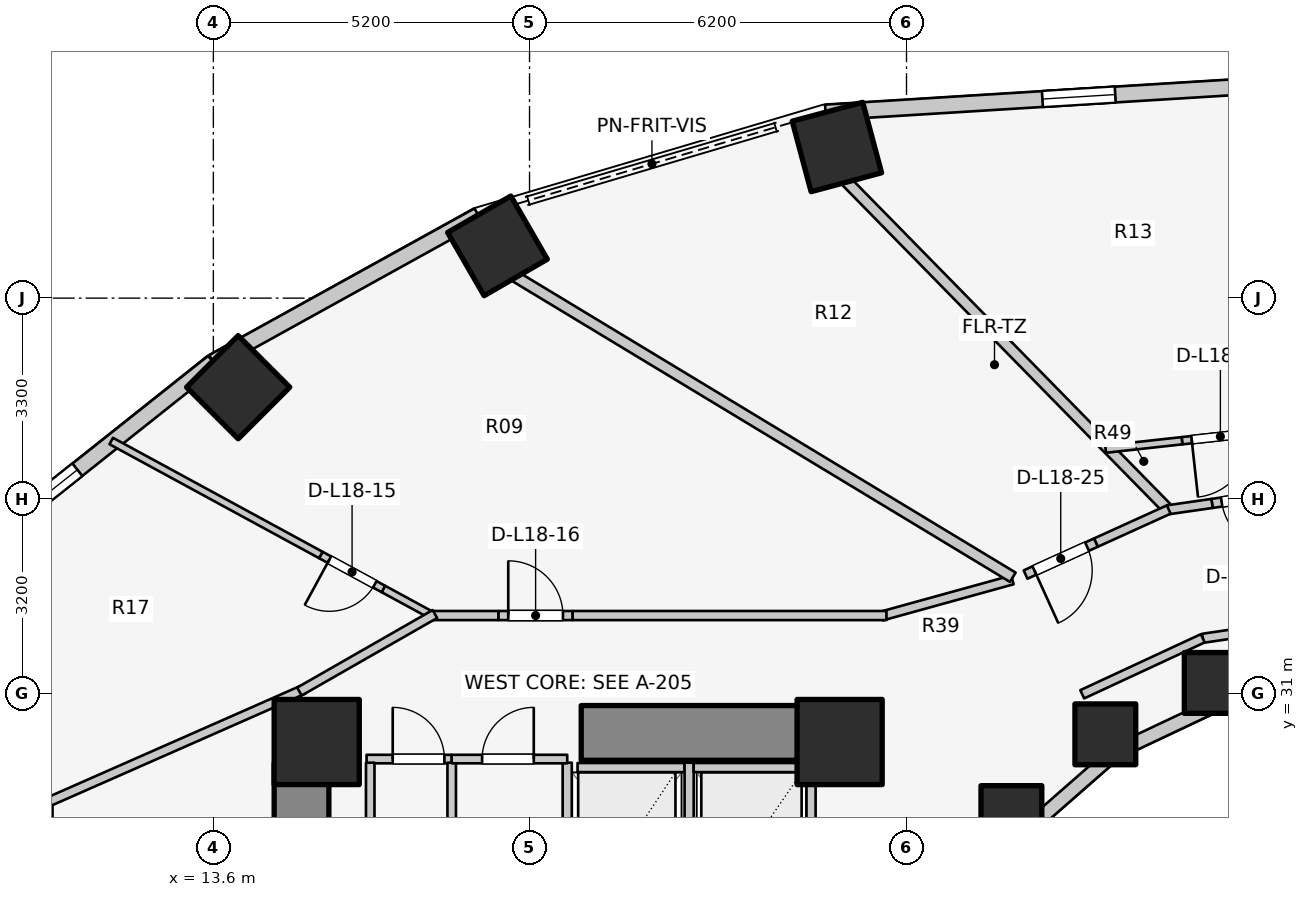
"""IFC4 building model, lengths in metres.
Left out: names, types, materials, properties, quantities, classifications, styles, units other than length and angle.
Written with IfcOpenShell. Run it as: python <this file> out.ifc"""

import sys

from ifc_helpers import new_model, si_unit, direction, frame, frame_2d, origin, origin_2d, place, context, subcontext, project, spatial, rectangle, extrude, element, fill, save


model = new_model("IFC4")
c1 = context("Model", 3, precision=1e-05, world=origin(), true_north=direction((0.0, 1.0)))
c2 = subcontext(c1, "Body", "Model", "MODEL_VIEW")
j1 = project(units=[si_unit("LENGTHUNIT", "METRE"), si_unit("PLANEANGLEUNIT", "RADIAN")], contexts=[c1])
p1 = place(None, origin())
s1 = spatial("IfcSite", under=j1, at=p1, CompositionType="ELEMENT")
p2 = place(p1, origin())
s2 = spatial("IfcBuilding", under=s1, at=p2, CompositionType="ELEMENT")
p3 = place(p2, frame((0.0, 0.0, 61.7)))
s3 = spatial("IfcBuildingStorey", under=s2, at=p3, CompositionType="ELEMENT", Elevation=61.7)
p4 = place(p3, frame((15.05, 17.05, 0.0), z_axis=(0.0, 0.0, 1.0), x_axis=(0.0, 1.0, 0.0)))
e1 = element("IfcWall", 1, at=p4, inside=s3, PredefinedType="SHEAR", context=c2, shape_type="SweptSolid", body=[
    extrude(rectangle(XDim=12.8, YDim=0.9, at=frame_2d((6.4, 0.0))), origin(), (0.0, 0.0, 1.0), 3.1),
])
p5 = place(p3, frame((19.65, 30.35, 0.0), z_axis=(0.0, 0.0, 1.0), x_axis=(1.0, 0.0, 0.0)))
e2 = element("IfcWall", 2, at=p5, inside=s3, PredefinedType="SHEAR", context=c2, shape_type="SweptSolid", body=[
    extrude(rectangle(XDim=4.5, YDim=0.9, at=frame_2d((2.25, 0.0))), origin(), (0.0, 0.0, 1.0), 3.1),
])
for number, where, z_axis, x_axis in (
    (3, (23.9, 30.2, 0.0), (0.0, 0.0, 1.0), (1.0, 0.0, 0.0)),
    (4, (15.3, 30.2, 0.0), (0.0, 0.0, 1.0), (1.0, 0.0, 0.0)),
):
    element("IfcColumn", number, at=place(p3, frame(where, z_axis=z_axis, x_axis=x_axis)), inside=s3, PredefinedType="COLUMN", context=c2, shape_type="SweptSolid", body=[
        extrude(rectangle(XDim=1.4, YDim=1.4, at=origin_2d()), origin(), (0.0, 0.0, 1.0), 3.1),
    ])
p6 = place(p3, frame((30.069, 31.172, 0.0), z_axis=(0.0, 0.0, 1.0), x_axis=(1.0, 0.0, 0.0)))
e5 = element("IfcColumn", 5, at=p6, inside=s3, PredefinedType="COLUMN", context=c2, shape_type="SweptSolid", body=[
    extrude(rectangle(XDim=1.0, YDim=1.0, at=origin_2d()), origin(), (0.0, 0.0, 1.0), 3.1),
])
p7 = place(p3, frame((23.855, 39.986, 0.0), z_axis=(0.0, 0.0, 1.0), x_axis=(-0.258819045103, 0.965925826289, 0.0)))
e6 = element("IfcColumn", 6, at=p7, inside=s3, PredefinedType="COLUMN", context=c2, shape_type="SweptSolid", body=[
    extrude(rectangle(XDim=1.2, YDim=1.2, at=origin_2d()), origin(), (0.0, 0.0, 1.0), 3.1),
])
p8 = place(p3, frame((28.27, 30.327, 0.0), z_axis=(0.0, 0.0, 1.0), x_axis=(1.0, 0.0, 0.0)))
e7 = element("IfcColumn", 7, at=p8, inside=s3, PredefinedType="COLUMN", context=c2, shape_type="SweptSolid", body=[
    extrude(rectangle(XDim=1.0, YDim=1.0, at=origin_2d()), origin(), (0.0, 0.0, 1.0), 3.1),
])
p9 = place(p3, frame((18.273, 38.359, 0.0), z_axis=(0.0, 0.0, 1.0), x_axis=(-0.5, 0.866025403784, 0.0)))
e8 = element("IfcColumn", 8, at=p9, inside=s3, PredefinedType="COLUMN", context=c2, shape_type="SweptSolid", body=[
    extrude(rectangle(XDim=1.2, YDim=1.2, at=origin_2d()), origin(), (0.0, 0.0, 1.0), 3.1),
])
p10 = place(p3, frame((26.725, 28.982, 0.0), z_axis=(0.0, 0.0, 1.0), x_axis=(1.0, 0.0, 0.0)))
e9 = element("IfcColumn", 9, at=p10, inside=s3, PredefinedType="COLUMN", context=c2, shape_type="SweptSolid", body=[
    extrude(rectangle(XDim=1.0, YDim=1.0, at=origin_2d()), origin(), (0.0, 0.0, 1.0), 3.1),
])
p11 = place(p3, frame((14.008, 36.035, 0.0), z_axis=(0.0, 0.0, 1.0), x_axis=(-0.707106781187, 0.707106781187, 0.0)))
e10 = element("IfcColumn", 10, at=p11, inside=s3, PredefinedType="COLUMN", context=c2, shape_type="SweptSolid", body=[
    extrude(rectangle(XDim=1.2, YDim=1.2, at=origin_2d()), origin(), (0.0, 0.0, 1.0), 3.1),
])
p12 = place(p3, frame((32.0, 31.12, 0.0), z_axis=(0.0, 0.0, 1.0), x_axis=(-0.988901730308, -0.148571086668, 0.0)))
e11 = element("IfcWall", 11, at=p12, inside=s3, PredefinedType="STANDARD", context=c2, shape_type="SweptSolid", body=[
    extrude(rectangle(XDim=1.864, YDim=0.23, at=frame_2d((0.932, 0.0))), origin(), (0.0, 0.0, 1.0), 1.22),
])
p13 = place(p3, frame((30.157, 30.843, 0.0), z_axis=(0.0, 0.0, 1.0), x_axis=(-0.904179699603, -0.427152280606, 0.0)))
e12 = element("IfcWall", 12, at=p13, inside=s3, PredefinedType="STANDARD", context=c2, shape_type="SweptSolid", body=[
    extrude(rectangle(XDim=1.899, YDim=0.23, at=frame_2d((0.95, 0.0))), origin(), (0.0, 0.0, 1.0), 1.22),
])
p14 = place(p3, frame((28.44, 30.032, 0.0), z_axis=(0.0, 0.0, 1.0), x_axis=(-0.752576694707, -0.658504607869, 0.0)))
e13 = element("IfcWall", 13, at=p14, inside=s3, PredefinedType="STANDARD", context=c2, shape_type="SweptSolid", body=[
    extrude(rectangle(XDim=1.959, YDim=0.23, at=frame_2d((0.98, 0.0))), origin(), (0.0, 0.0, 1.0), 1.22),
])
p15 = place(p3, frame((32.0, 41.069, 0.0), z_axis=(0.0, 0.0, 1.0), x_axis=(-0.998090514779, -0.061768311519, 0.0)))
e14 = element("IfcWall", 14, at=p15, inside=s3, PredefinedType="STANDARD", context=c2, shape_type="SweptSolid", body=[
    extrude(rectangle(XDim=8.348, YDim=0.26, at=frame_2d((4.174, 0.0))), origin(), (0.0, 0.0, 1.0), 1.22),
])
p16 = place(p15, frame((3.574, 0.0, 0.15)))
e15 = element("IfcOpeningElement", 15, at=p16, cuts=e14, PredefinedType="OPENING", context=c2, shape_type="SweptSolid", body=[
    extrude(rectangle(XDim=1.2, YDim=0.9, at=frame_2d((0.6, 0.45))), frame((0.0, 0.14, 0.0), z_axis=(0.0, -1.0, 0.0), x_axis=(1.0, 0.0, 0.0)), (0.0, 0.0, 1.0), 0.28),
])
p17 = place(p3, frame((17.958, 38.862, 0.0), z_axis=(0.0, 0.0, 1.0), x_axis=(-0.875137303239, -0.483874674352, 0.0)))
e16 = element("IfcWall", 16, at=p17, inside=s3, PredefinedType="STANDARD", context=c2, shape_type="SweptSolid", body=[
    extrude(rectangle(XDim=4.985, YDim=0.26, at=frame_2d((2.493, 0.0))), origin(), (0.0, 0.0, 1.0), 1.22),
])
p18 = place(p3, frame((13.595, 36.45, 0.0), z_axis=(0.0, 0.0, 1.0), x_axis=(-0.783123133379, -0.621866672179, 0.0)))
e17 = element("IfcWall", 17, at=p18, inside=s3, PredefinedType="STANDARD", context=c2, shape_type="SweptSolid", body=[
    extrude(rectangle(XDim=4.839, YDim=0.26, at=frame_2d((2.419, 0.0))), origin(), (0.0, 0.0, 1.0), 1.22),
])
p19 = place(p18, frame((2.849, 0.0, 0.15)))
e18 = element("IfcOpeningElement", 18, at=p19, cuts=e17, PredefinedType="OPENING", context=c2, shape_type="SweptSolid", body=[
    extrude(rectangle(XDim=1.2, YDim=0.9, at=frame_2d((0.6, 0.45))), frame((0.0, 0.14, 0.0), z_axis=(0.0, -1.0, 0.0), x_axis=(1.0, 0.0, 0.0)), (0.0, 0.0, 1.0), 0.28),
])
p20 = place(p3, frame((19.59, 29.78, 0.0), z_axis=(0.0, 0.0, 1.0), x_axis=(1.0, 0.0, 0.0)))
e19 = element("IfcWall", 19, at=p20, inside=s3, PredefinedType="SOLIDWALL", context=c2, shape_type="SweptSolid", body=[
    extrude(rectangle(XDim=1.76, YDim=0.15, at=frame_2d((0.88, 0.0))), origin(), (0.0, 0.0, 1.0), 2.575),
])
for number, where, z_axis, x_axis in (
    (20, (19.42, 27.14, 0.0), (0.0, 0.0, 1.0), (0.0, 1.0, 0.0)),
    (21, (21.425, 27.14, 0.0), (0.0, 0.0, 1.0), (0.0, 1.0, 0.0)),
):
    element("IfcWall", number, at=place(p3, frame(where, z_axis=z_axis, x_axis=x_axis)), inside=s3, PredefinedType="SOLIDWALL", context=c2, shape_type="SweptSolid", body=[
        extrude(rectangle(XDim=2.72, YDim=0.15, at=frame_2d((1.36, 0.0))), origin(), (0.0, 0.0, 1.0), 2.575),
    ])
p21 = place(p3, frame((21.5, 29.78, 0.0), z_axis=(0.0, 0.0, 1.0), x_axis=(1.0, 0.0, 0.0)))
e22 = element("IfcWall", 22, at=p21, inside=s3, PredefinedType="SOLIDWALL", context=c2, shape_type="SweptSolid", body=[
    extrude(rectangle(XDim=1.76, YDim=0.15, at=frame_2d((0.88, 0.0))), origin(), (0.0, 0.0, 1.0), 2.575),
])
p22 = place(p3, frame((23.43, 27.14, 0.0), z_axis=(0.0, 0.0, 1.0), x_axis=(0.0, 1.0, 0.0)))
e23 = element("IfcWall", 23, at=p22, inside=s3, PredefinedType="SOLIDWALL", context=c2, shape_type="SweptSolid", body=[
    extrude(rectangle(XDim=2.72, YDim=0.15, at=frame_2d((1.36, 0.0))), origin(), (0.0, 0.0, 1.0), 2.575),
])
p23 = place(p3, frame((16.12, 29.92, 0.0), z_axis=(0.0, 0.0, 1.0), x_axis=(1.0, 0.0, 0.0)))
e24 = element("IfcWall", 24, at=p23, inside=s3, PredefinedType="PLUMBINGWALL", context=c2, shape_type="SweptSolid", body=[
    extrude(rectangle(XDim=1.4, YDim=0.14, at=frame_2d((0.7, 0.0))), origin(), (0.0, 0.0, 1.0), 2.575),
])
p24 = place(p23, frame((0.43, 0.0, 0.0)))
e25 = element("IfcOpeningElement", 25, at=p24, cuts=e24, PredefinedType="OPENING", context=c2, shape_type="SweptSolid", body=[
    extrude(rectangle(XDim=0.85, YDim=2.05, at=frame_2d((0.425, 1.025))), frame((0.0, 0.08, 0.0), z_axis=(0.0, -1.0, 0.0), x_axis=(1.0, 0.0, 0.0)), (0.0, 0.0, 1.0), 0.16),
])
for number, where, z_axis, x_axis in (
    (26, (16.18, 25.98, 0.0), (0.0, 0.0, 1.0), (0.0, 1.0, 0.0)),
    (27, (17.52, 25.98, 0.0), (0.0, 0.0, 1.0), (0.0, 1.0, 0.0)),
):
    element("IfcWall", number, at=place(p3, frame(where, z_axis=z_axis, x_axis=x_axis)), inside=s3, PredefinedType="PLUMBINGWALL", context=c2, shape_type="SweptSolid", body=[
        extrude(rectangle(XDim=3.88, YDim=0.14, at=frame_2d((1.94, 0.0))), origin(), (0.0, 0.0, 1.0), 2.575),
    ])
p25 = place(p3, frame((17.52, 29.92, 0.0), z_axis=(0.0, 0.0, 1.0), x_axis=(1.0, 0.0, 0.0)))
e28 = element("IfcWall", 28, at=p25, inside=s3, PredefinedType="PLUMBINGWALL", context=c2, shape_type="SweptSolid", body=[
    extrude(rectangle(XDim=1.9, YDim=0.14, at=frame_2d((0.95, 0.0))), origin(), (0.0, 0.0, 1.0), 2.575),
])
p26 = place(p25, frame((0.5, 0.0, 0.0)))
e29 = element("IfcOpeningElement", 29, at=p26, cuts=e28, PredefinedType="OPENING", context=c2, shape_type="SweptSolid", body=[
    extrude(rectangle(XDim=0.85, YDim=2.05, at=frame_2d((0.425, 1.025))), frame((0.0, 0.08, 0.0), z_axis=(0.0, -1.0, 0.0), x_axis=(1.0, 0.0, 0.0)), (0.0, 0.0, 1.0), 0.16),
])
p27 = place(p3, frame((32.0, 32.22, 0.0), z_axis=(0.0, 0.0, 1.0), x_axis=(-0.989268584896, -0.146108408166, 0.0)))
e30 = element("IfcWall", 30, at=p27, inside=s3, PredefinedType="PARTITIONING", context=c2, shape_type="SweptSolid", body=[
    extrude(rectangle(XDim=2.151, YDim=0.15, at=frame_2d((1.075, 0.0))), origin(), (0.0, 0.0, 1.0), 1.22),
])
p28 = place(p3, frame((29.873, 31.906, 0.0), z_axis=(0.0, 0.0, 1.0), x_axis=(-0.906943449489, -0.421252393975, 0.0)))
e31 = element("IfcWall", 31, at=p28, inside=s3, PredefinedType="PARTITIONING", context=c2, shape_type="SweptSolid", body=[
    extrude(rectangle(XDim=2.186, YDim=0.15, at=frame_2d((1.093, 0.0))), origin(), (0.0, 0.0, 1.0), 1.22),
])
p29 = place(p3, frame((10.844, 29.196, 0.0), z_axis=(0.0, 0.0, 1.0), x_axis=(0.91502756289, 0.403391322604, 0.0)))
e32 = element("IfcWall", 32, at=p29, inside=s3, PredefinedType="PARTITIONING", context=c2, shape_type="SweptSolid", body=[
    extrude(rectangle(XDim=4.637, YDim=0.15, at=frame_2d((2.319, 0.0))), origin(), (0.0, 0.0, 1.0), 1.22),
])
p30 = place(p3, frame((17.244, 32.256, 0.0), z_axis=(0.0, 0.0, 1.0), x_axis=(-0.878580692024, 0.477593935894, 0.0)))
e33 = element("IfcWall", 33, at=p30, inside=s3, PredefinedType="MOVABLE", context=c2, shape_type="SweptSolid", body=[
    extrude(rectangle(XDim=0.966, YDim=0.12, at=frame_2d((0.483, 0.0))), origin(), (0.0, 0.0, 1.0), 2.575),
])
p31 = place(p3, frame((16.396, 32.717, 0.0), z_axis=(0.0, 0.0, 1.0), x_axis=(-0.878540750178, 0.4776674055, 0.0)))
e34 = element("IfcWall", 34, at=p31, inside=s3, PredefinedType="MOVABLE", context=c2, shape_type="SweptSolid", body=[
    extrude(rectangle(XDim=1.17, YDim=0.12, at=frame_2d((0.585, 0.0))), origin(), (0.0, 0.0, 1.0), 2.11),
])
p32 = place(p31, frame((0.16, 0.0, 0.0)))
e35 = element("IfcOpeningElement", 35, at=p32, cuts=e34, PredefinedType="OPENING", context=c2, shape_type="SweptSolid", body=[
    extrude(rectangle(XDim=0.85, YDim=2.05, at=frame_2d((0.425, 1.025))), frame((0.0, 0.07, 0.0), z_axis=(0.0, -1.0, 0.0), x_axis=(1.0, 0.0, 0.0)), (0.0, 0.0, 1.0), 0.14),
])
p33 = place(p3, frame((15.368, 33.276, 0.0), z_axis=(0.0, 0.0, 1.0), x_axis=(-0.878543913196, 0.477661587932, 0.0)))
e36 = element("IfcWall", 36, at=p33, inside=s3, PredefinedType="MOVABLE", context=c2, shape_type="SweptSolid", body=[
    extrude(rectangle(XDim=3.924, YDim=0.12, at=frame_2d((1.962, 0.0))), origin(), (0.0, 0.0, 1.0), 1.22),
])
p34 = place(p3, frame((26.742, 32.867, 0.0), z_axis=(0.0, 0.0, 1.0), x_axis=(-0.963833843713, -0.266503886865, 0.0)))
e37 = element("IfcWall", 37, at=p34, inside=s3, PredefinedType="PARTITIONING", context=c2, shape_type="SweptSolid", body=[
    extrude(rectangle(XDim=2.232, YDim=0.15, at=frame_2d((1.116, 0.0))), origin(), (0.0, 0.0, 1.0), 1.22),
])
p35 = place(p3, frame((17.15, 32.28, 0.0), z_axis=(0.0, 0.0, 1.0), x_axis=(1.0, 0.0, 0.0)))
e38 = element("IfcWall", 38, at=p35, inside=s3, PredefinedType="PARTITIONING", context=c2, shape_type="SweptSolid", body=[
    extrude(rectangle(XDim=1.14, YDim=0.15, at=frame_2d((0.57, 0.0))), origin(), (0.0, 0.0, 1.0), 2.575),
])
p36 = place(p3, frame((18.29, 32.28, 0.0), z_axis=(0.0, 0.0, 1.0), x_axis=(1.0, 0.0, 0.0)))
e39 = element("IfcWall", 39, at=p36, inside=s3, PredefinedType="PARTITIONING", context=c2, shape_type="SweptSolid", body=[
    extrude(rectangle(XDim=1.22, YDim=0.15, at=frame_2d((0.61, 0.0))), origin(), (0.0, 0.0, 1.0), 2.16),
])
p37 = place(p36, frame((0.16, 0.0, 0.0)))
e40 = element("IfcOpeningElement", 40, at=p37, cuts=e39, PredefinedType="OPENING", context=c2, shape_type="SweptSolid", body=[
    extrude(rectangle(XDim=0.9, YDim=2.1, at=frame_2d((0.45, 1.05))), frame((0.0, 0.085, 0.0), z_axis=(0.0, -1.0, 0.0), x_axis=(1.0, 0.0, 0.0)), (0.0, 0.0, 1.0), 0.17),
])
p38 = place(p3, frame((19.51, 32.28, 0.0), z_axis=(0.0, 0.0, 1.0), x_axis=(1.0, 0.0, 0.0)))
e41 = element("IfcWall", 41, at=p38, inside=s3, PredefinedType="PARTITIONING", context=c2, shape_type="SweptSolid", body=[
    extrude(rectangle(XDim=5.16, YDim=0.15, at=frame_2d((2.58, 0.0))), origin(), (0.0, 0.0, 1.0), 1.22),
])
p39 = place(p3, frame((17.243, 32.305, 0.0), z_axis=(0.0, 0.0, 1.0), x_axis=(-0.867991349648, -0.496579315857, 0.0)))
e42 = element("IfcWall", 42, at=p39, inside=s3, PredefinedType="PARTITIONING", context=c2, shape_type="SweptSolid", body=[
    extrude(rectangle(XDim=2.567, YDim=0.15, at=frame_2d((1.283, 0.0))), origin(), (0.0, 0.0, 1.0), 1.22),
])
p40 = place(p3, frame((29.267, 34.061, 0.0), z_axis=(0.0, 0.0, 1.0), x_axis=(-0.700234780085, 0.713912636644, 0.0)))
e43 = element("IfcWall", 43, at=p40, inside=s3, PredefinedType="PARTITIONING", context=c2, shape_type="SweptSolid", body=[
    extrude(rectangle(XDim=7.515, YDim=0.18, at=frame_2d((3.757, 0.0))), origin(), (0.0, 0.0, 1.0), 1.22),
])
p41 = place(p3, frame((26.748, 32.91, 0.0), z_axis=(0.0, 0.0, 1.0), x_axis=(-0.855817136021, 0.517278483694, 0.0)))
e44 = element("IfcWall", 44, at=p41, inside=s3, PredefinedType="PARTITIONING", context=c2, shape_type="SweptSolid", body=[
    extrude(rectangle(XDim=9.564, YDim=0.18, at=frame_2d((4.782, 0.0))), origin(), (0.0, 0.0, 1.0), 1.22),
])
p42 = place(p3, frame((30.793, 35.294, 0.0), z_axis=(0.0, 0.0, 1.0), x_axis=(-0.994000385789, -0.109376565367, 0.0)))
e45 = element("IfcWall", 45, at=p42, inside=s3, PredefinedType="MOVABLE", context=c2, shape_type="SweptSolid", body=[
    extrude(rectangle(XDim=1.27, YDim=0.12, at=frame_2d((0.635, 0.0))), origin(), (0.0, 0.0, 1.0), 2.575),
])
p43 = place(p42, frame((0.16, 0.0, 0.0)))
e46 = element("IfcOpeningElement", 46, at=p43, cuts=e45, PredefinedType="OPENING", context=c2, shape_type="SweptSolid", body=[
    extrude(rectangle(XDim=0.95, YDim=2.1, at=frame_2d((0.475, 1.05))), frame((0.0, 0.07, 0.0), z_axis=(0.0, -1.0, 0.0), x_axis=(1.0, 0.0, 0.0)), (0.0, 0.0, 1.0), 0.14),
])
p44 = place(p3, frame((29.531, 35.155, 0.0), z_axis=(0.0, 0.0, 1.0), x_axis=(-0.99400561549, -0.109329028054, 0.0)))
e47 = element("IfcWall", 47, at=p44, inside=s3, PredefinedType="MOVABLE", context=c2, shape_type="SweptSolid", body=[
    extrude(rectangle(XDim=1.264, YDim=0.12, at=frame_2d((0.632, 0.0))), origin(), (0.0, 0.0, 1.0), 2.575),
])
p45 = place(p3, frame((31.281, 34.305, 0.0), z_axis=(0.0, 0.0, 1.0), x_axis=(-0.989721405299, -0.14300888047, 0.0)))
e48 = element("IfcWall", 48, at=p45, inside=s3, PredefinedType="PARTITIONING", context=c2, shape_type="SweptSolid", body=[
    extrude(rectangle(XDim=1.27, YDim=0.15, at=frame_2d((0.635, 0.0))), origin(), (0.0, 0.0, 1.0), 2.575),
])
p46 = place(p45, frame((0.16, 0.0, 0.0)))
e49 = element("IfcOpeningElement", 49, at=p46, cuts=e48, PredefinedType="OPENING", context=c2, shape_type="SweptSolid", body=[
    extrude(rectangle(XDim=0.95, YDim=2.1, at=frame_2d((0.475, 1.05))), frame((0.0, 0.085, 0.0), z_axis=(0.0, -1.0, 0.0), x_axis=(1.0, 0.0, 0.0)), (0.0, 0.0, 1.0), 0.17),
])
p47 = place(p3, frame((30.024, 34.124, 0.0), z_axis=(0.0, 0.0, 1.0), x_axis=(-0.98974875873, -0.142819447526, 0.0)))
e50 = element("IfcWall", 50, at=p47, inside=s3, PredefinedType="PARTITIONING", context=c2, shape_type="SweptSolid", body=[
    extrude(rectangle(XDim=0.733, YDim=0.15, at=frame_2d((0.367, 0.0))), origin(), (0.0, 0.0, 1.0), 2.575),
])
p48 = place(p3, frame((29.313, 34.023, 0.0), z_axis=(0.0, 0.0, 1.0), x_axis=(-0.910569685542, -0.413355594822, 0.0)))
e51 = element("IfcWall", 51, at=p48, inside=s3, PredefinedType="PARTITIONING", context=c2, shape_type="SweptSolid", body=[
    extrude(rectangle(XDim=1.316, YDim=0.15, at=frame_2d((0.658, 0.0))), origin(), (0.0, 0.0, 1.0), 1.22),
])
p49 = place(p3, frame((28.115, 33.479, 0.0), z_axis=(0.0, 0.0, 1.0), x_axis=(-0.910596749825, -0.413295970472, 0.0)))
e52 = element("IfcWall", 52, at=p49, inside=s3, PredefinedType="PARTITIONING", context=c2, shape_type="SweptSolid", body=[
    extrude(rectangle(XDim=1.27, YDim=0.15, at=frame_2d((0.635, 0.0))), origin(), (0.0, 0.0, 1.0), 2.16),
])
p50 = place(p49, frame((0.16, 0.0, 0.0)))
e53 = element("IfcOpeningElement", 53, at=p50, cuts=e52, PredefinedType="OPENING", context=c2, shape_type="SweptSolid", body=[
    extrude(rectangle(XDim=0.95, YDim=2.1, at=frame_2d((0.475, 1.05))), frame((0.0, 0.085, 0.0), z_axis=(0.0, -1.0, 0.0), x_axis=(1.0, 0.0, 0.0)), (0.0, 0.0, 1.0), 0.17),
])
p51 = place(p16, origin())
e54 = element("IfcWindow", 54, at=p51, inside=s3, PartitioningType="SINGLE_PANEL", PredefinedType="WINDOW", context=c2, shape_type="SweptSolid", body=[
    extrude(rectangle(XDim=1.2, YDim=0.9, at=frame_2d((0.6, 0.45))), frame((0.0, 0.03, 0.0), z_axis=(0.0, -1.0, 0.0), x_axis=(1.0, 0.0, 0.0)), (0.0, 0.0, 1.0), 0.06),
])
fill(e15, e54)
p52 = place(p19, origin())
e55 = element("IfcWindow", 55, at=p52, inside=s3, PartitioningType="SINGLE_PANEL", PredefinedType="WINDOW", context=c2, shape_type="SweptSolid", body=[
    extrude(rectangle(XDim=1.2, YDim=0.9, at=frame_2d((0.6, 0.45))), frame((0.0, 0.03, 0.0), z_axis=(0.0, -1.0, 0.0), x_axis=(1.0, 0.0, 0.0)), (0.0, 0.0, 1.0), 0.06),
])
fill(e18, e55)
p53 = place(p24, origin())
e56 = element("IfcDoor", 56, at=p53, inside=s3, OperationType="SINGLE_SWING_LEFT", PredefinedType="DOOR", context=c2, shape_type="SweptSolid", body=[
    extrude(rectangle(XDim=0.85, YDim=2.05, at=frame_2d((0.425, 1.025))), frame((0.0, 0.025, 0.0), z_axis=(0.0, -1.0, 0.0), x_axis=(1.0, 0.0, 0.0)), (0.0, 0.0, 1.0), 0.05),
])
fill(e25, e56)
p54 = place(p26, origin())
e57 = element("IfcDoor", 57, at=p54, inside=s3, OperationType="SINGLE_SWING_RIGHT", PredefinedType="DOOR", context=c2, shape_type="SweptSolid", body=[
    extrude(rectangle(XDim=0.85, YDim=2.05, at=frame_2d((0.425, 1.025))), frame((0.0, 0.025, 0.0), z_axis=(0.0, -1.0, 0.0), x_axis=(1.0, 0.0, 0.0)), (0.0, 0.0, 1.0), 0.05),
])
fill(e29, e57)
p55 = place(p32, origin())
e58 = element("IfcDoor", 58, at=p55, inside=s3, OperationType="SINGLE_SWING_RIGHT", PredefinedType="DOOR", context=c2, shape_type="SweptSolid", body=[
    extrude(rectangle(XDim=0.85, YDim=2.05, at=frame_2d((0.425, 1.025))), frame((0.0, 0.025, 0.0), z_axis=(0.0, -1.0, 0.0), x_axis=(1.0, 0.0, 0.0)), (0.0, 0.0, 1.0), 0.05),
])
fill(e35, e58)
p56 = place(p37, origin())
e59 = element("IfcDoor", 59, at=p56, inside=s3, OperationType="SINGLE_SWING_LEFT", PredefinedType="DOOR", context=c2, shape_type="SweptSolid", body=[
    extrude(rectangle(XDim=0.9, YDim=2.1, at=frame_2d((0.45, 1.05))), frame((0.0, 0.025, 0.0), z_axis=(0.0, -1.0, 0.0), x_axis=(1.0, 0.0, 0.0)), (0.0, 0.0, 1.0), 0.05),
])
fill(e40, e59)
p57 = place(p43, origin())
e60 = element("IfcDoor", 60, at=p57, inside=s3, OperationType="SINGLE_SWING_RIGHT", PredefinedType="DOOR", context=c2, shape_type="SweptSolid", body=[
    extrude(rectangle(XDim=0.95, YDim=2.1, at=frame_2d((0.475, 1.05))), frame((0.0, 0.025, 0.0), z_axis=(0.0, -1.0, 0.0), x_axis=(1.0, 0.0, 0.0)), (0.0, 0.0, 1.0), 0.05),
])
fill(e46, e60)
p58 = place(p46, origin())
e61 = element("IfcDoor", 61, at=p58, inside=s3, OperationType="SINGLE_SWING_LEFT", PredefinedType="DOOR", context=c2, shape_type="SweptSolid", body=[
    extrude(rectangle(XDim=0.95, YDim=2.1, at=frame_2d((0.475, 1.05))), frame((0.0, 0.025, 0.0), z_axis=(0.0, -1.0, 0.0), x_axis=(1.0, 0.0, 0.0)), (0.0, 0.0, 1.0), 0.05),
])
fill(e49, e61)
p59 = place(p50, origin())
e62 = element("IfcDoor", 62, at=p59, inside=s3, OperationType="SINGLE_SWING_RIGHT", PredefinedType="DOOR", context=c2, shape_type="SweptSolid", body=[
    extrude(rectangle(XDim=0.95, YDim=2.1, at=frame_2d((0.475, 1.05))), frame((0.0, 0.025, 0.0), z_axis=(0.0, -1.0, 0.0), x_axis=(1.0, 0.0, 0.0)), (0.0, 0.0, 1.0), 0.05),
])
fill(e53, e62)
save(model, sys.argv[1])
